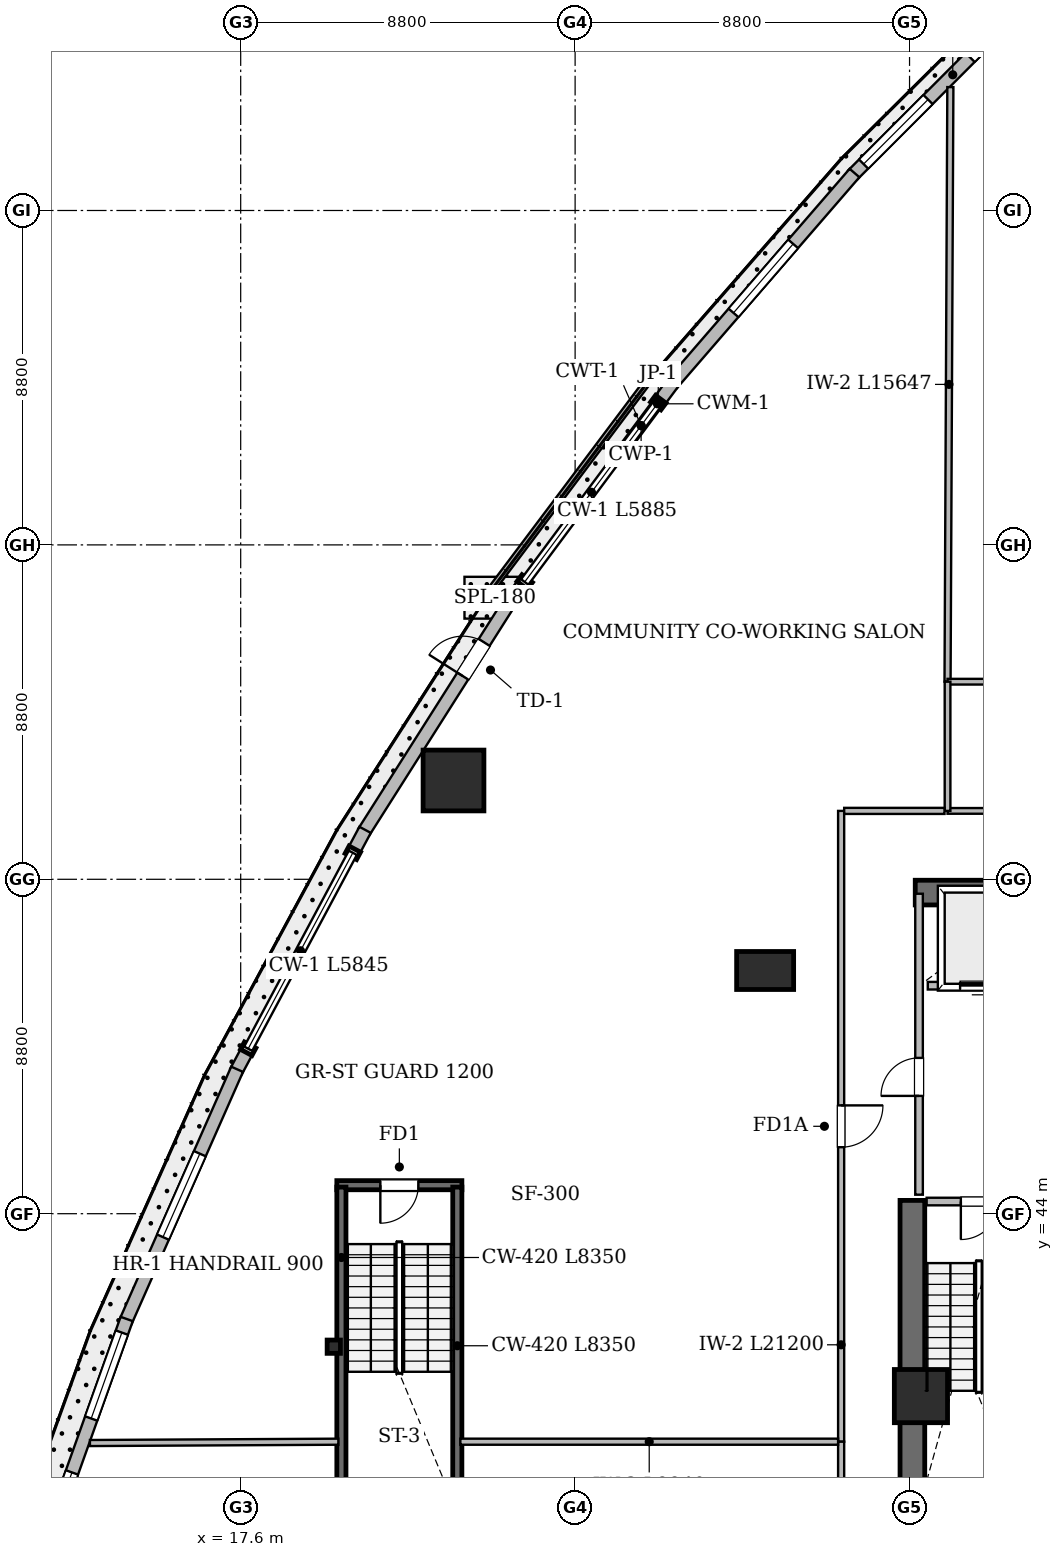
"""IFC4 building model, lengths in metres.
Left out: names, types, materials, properties, quantities, classifications, styles, units other than length and angle.
Written with IfcOpenShell. Run it as: python <this file> out.ifc"""

import sys

from ifc_helpers import new_model, si_unit, direction, frame, frame_2d, origin, origin_2d, place, context, subcontext, project, spatial, rectangle, i_section, extrude, element, fill, save


model = new_model("IFC4")
c1 = context("Model", 3, precision=1e-05, world=origin(), true_north=direction((0.0, 1.0)))
c2 = subcontext(c1, "Body", "Model", "MODEL_VIEW")
j1 = project(units=[si_unit("LENGTHUNIT", "METRE"), si_unit("PLANEANGLEUNIT", "RADIAN")], contexts=[c1])
p1 = place(None, origin())
s1 = spatial("IfcSite", under=j1, at=p1, CompositionType="ELEMENT")
p2 = place(p1, origin())
s2 = spatial("IfcBuilding", under=s1, at=p2, CompositionType="ELEMENT")
p3 = place(p2, frame((0.0, 0.0, 4.8)))
s3 = spatial("IfcBuildingStorey", under=s2, at=p3, CompositionType="ELEMENT", Elevation=4.8)
p4 = place(p3, frame((35.35, 52.45, 0.0), z_axis=(0.0, 0.0, 1.0), x_axis=(1.0, 0.0, 0.0)))
e1 = element("IfcWall", 1, at=p4, inside=s3, PredefinedType="SHEAR", context=c2, shape_type="SweptSolid", body=[
    extrude(rectangle(XDim=17.3, YDim=0.65, at=frame_2d((8.65, 0.0))), origin(), (0.0, 0.0, 1.0), 4.5),
])
p5 = place(p3, frame((35.275, 34.95, 0.0), z_axis=(0.0, 0.0, 1.0), x_axis=(0.0, 1.0, 0.0)))
e2 = element("IfcWall", 2, at=p5, inside=s3, PredefinedType="SHEAR", context=c2, shape_type="SweptSolid", body=[
    extrude(rectangle(XDim=9.4, YDim=0.65, at=frame_2d((4.7, 0.0))), origin(), (0.0, 0.0, 1.0), 4.5),
])
p6 = place(p3, frame((35.5, 39.2, 0.0), z_axis=(0.0, 0.0, 1.0), x_axis=(1.0, 0.0, 0.0)))
e3 = element("IfcColumn", 3, at=p6, inside=s3, PredefinedType="COLUMN", context=c2, shape_type="SweptSolid", body=[
    extrude(rectangle(XDim=1.4, YDim=1.4, at=origin_2d()), origin(), (0.0, 0.0, 1.0), 4.8),
])
p7 = place(p3, frame((31.4, 50.4, 0.0), z_axis=(0.0, 0.0, 1.0), x_axis=(1.0, 0.0, 0.0)))
e4 = element("IfcColumn", 4, at=p7, inside=s3, PredefinedType="COLUMN", context=c2, shape_type="SweptSolid", body=[
    extrude(rectangle(XDim=1.5, YDim=1.0, at=origin_2d()), origin(), (0.0, 0.0, 1.0), 4.8),
])
p8 = place(p3, frame((23.2, 55.4, 0.0), z_axis=(0.0, 0.0, 1.0), x_axis=(1.0, 0.0, 0.0)))
e5 = element("IfcColumn", 5, at=p8, inside=s3, PredefinedType="COLUMN", context=c2, shape_type="SweptSolid", body=[
    extrude(rectangle(XDim=1.6, YDim=1.6, at=origin_2d()), origin(), (0.0, 0.0, 1.0), 4.8),
])
p9 = place(p3, frame((20.05, 40.5, 0.0), z_axis=(0.0, 0.0, 1.0), x_axis=(1.0, 0.0, 0.0)))
e6 = element("IfcColumn", 6, at=p9, inside=s3, PredefinedType="PILASTER", context=c2, shape_type="SweptSolid", body=[
    extrude(i_section(OverallWidth=0.35, OverallDepth=0.35, WebThickness=0.012, FlangeThickness=0.019, FilletRadius=0.02, at=origin_2d()), origin(), (0.0, 0.0, 1.0), 4.8),
])
p10 = place(p3, frame((38.97, 76.608, 0.0), z_axis=(0.0, 0.0, 1.0), x_axis=(-0.706565985712, -0.707647163377, 0.0)))
e7 = element("IfcWall", 7, at=p10, inside=s3, PredefinedType="SOLIDWALL", context=c2, shape_type="SweptSolid", body=[
    extrude(rectangle(XDim=7.452, YDim=0.34, at=frame_2d((3.726, 0.0))), origin(), (0.0, 0.0, 1.0), 4.5),
])
p11 = place(p10, frame((0.68, 0.0, 0.75)))
e8 = element("IfcOpeningElement", 8, at=p11, cuts=e7, PredefinedType="OPENING", context=c2, shape_type="SweptSolid", body=[
    extrude(rectangle(XDim=2.4, YDim=2.2, at=frame_2d((1.2, 1.1))), frame((0.0, 0.18, 0.0), z_axis=(0.0, -1.0, 0.0), x_axis=(1.0, 0.0, 0.0)), (0.0, 0.0, 1.0), 0.36),
])
p12 = place(p10, frame((4.646, 0.0, 0.75)))
e9 = element("IfcOpeningElement", 9, at=p12, cuts=e7, PredefinedType="OPENING", context=c2, shape_type="SweptSolid", body=[
    extrude(rectangle(XDim=2.4, YDim=2.2, at=frame_2d((1.2, 1.1))), frame((0.0, 0.18, 0.0), z_axis=(0.0, -1.0, 0.0), x_axis=(1.0, 0.0, 0.0)), (0.0, 0.0, 1.0), 0.36),
])
p13 = place(p3, frame((33.752, 71.386, 0.0), z_axis=(0.0, 0.0, 1.0), x_axis=(-0.654356245841, -0.756186421148, 0.0)))
e10 = element("IfcWall", 10, at=p13, inside=s3, PredefinedType="SOLIDWALL", context=c2, shape_type="SweptSolid", body=[
    extrude(rectangle(XDim=7.334, YDim=0.34, at=frame_2d((3.667, 0.0))), origin(), (0.0, 0.0, 1.0), 4.5),
])
p14 = place(p13, frame((2.467, 0.0, 0.75)))
e11 = element("IfcOpeningElement", 11, at=p14, cuts=e10, PredefinedType="OPENING", context=c2, shape_type="SweptSolid", body=[
    extrude(rectangle(XDim=2.4, YDim=2.2, at=frame_2d((1.2, 1.1))), frame((0.0, 0.18, 0.0), z_axis=(0.0, -1.0, 0.0), x_axis=(1.0, 0.0, 0.0)), (0.0, 0.0, 1.0), 0.36),
])
for number, where, z_axis, x_axis in (
    (12, (28.997, 65.895, 0.0), (0.0, 0.0, 1.0), (-0.597, -0.802, 0.0)),
    (13, (25.085, 60.641, 0.0), (0.0, 0.0, 1.0), (-0.597, -0.802, 0.0)),
):
    element("IfcWall", number, at=place(p3, frame(where, z_axis=z_axis, x_axis=x_axis)), inside=s3, PredefinedType="SOLIDWALL", context=c2, shape_type="SweptSolid", body=[
        extrude(rectangle(XDim=0.705, YDim=0.34, at=frame_2d((0.353, 0.0))), origin(), (0.0, 0.0, 1.0), 4.5),
    ])
p15 = place(p3, frame((24.704, 60.133, 0.0), z_axis=(0.0, 0.0, 1.0), x_axis=(-0.535802171835, -0.844343551321, 0.0)))
e14 = element("IfcWall", 14, at=p15, inside=s3, PredefinedType="SOLIDWALL", context=c2, shape_type="SweptSolid", body=[
    extrude(rectangle(XDim=7.215, YDim=0.34, at=frame_2d((3.607, 0.0))), origin(), (0.0, 0.0, 1.0), 4.5),
])
p16 = place(p15, frame((1.301, 0.0, 0.0)))
e15 = element("IfcOpeningElement", 15, at=p16, cuts=e14, PredefinedType="OPENING", context=c2, shape_type="SweptSolid", body=[
    extrude(rectangle(XDim=1.05, YDim=2.15, at=frame_2d((0.525, 1.075))), frame((0.0, 0.18, 0.0), z_axis=(0.0, -1.0, 0.0), x_axis=(1.0, 0.0, 0.0)), (0.0, 0.0, 1.0), 0.36),
])
p17 = place(p3, frame((20.874, 54.102, 0.0), z_axis=(0.0, 0.0, 1.0), x_axis=(-0.471145137046, -0.882055701097, 0.0)))
e16 = element("IfcWall", 16, at=p17, inside=s3, PredefinedType="SOLIDWALL", context=c2, shape_type="SweptSolid", body=[
    extrude(rectangle(XDim=0.705, YDim=0.34, at=frame_2d((0.353, 0.0))), origin(), (0.0, 0.0, 1.0), 4.5),
])
p18 = place(p3, frame((17.807, 48.359, 0.0), z_axis=(0.0, 0.0, 1.0), x_axis=(-0.471163543588, -0.882045869099, 0.0)))
e17 = element("IfcWall", 17, at=p18, inside=s3, PredefinedType="SOLIDWALL", context=c2, shape_type="SweptSolid", body=[
    extrude(rectangle(XDim=0.705, YDim=0.34, at=frame_2d((0.352, 0.0))), origin(), (0.0, 0.0, 1.0), 4.5),
])
p19 = place(p3, frame((17.506, 47.8, 0.0), z_axis=(0.0, 0.0, 1.0), x_axis=(-0.40401716618, -0.914751403077, 0.0)))
e18 = element("IfcWall", 18, at=p19, inside=s3, PredefinedType="SOLIDWALL", context=c2, shape_type="SweptSolid", body=[
    extrude(rectangle(XDim=7.254, YDim=0.34, at=frame_2d((3.627, 0.0))), origin(), (0.0, 0.0, 1.0), 4.5),
])
p20 = place(p19, frame((2.428, 0.0, 0.75)))
e19 = element("IfcOpeningElement", 19, at=p20, cuts=e18, PredefinedType="OPENING", context=c2, shape_type="SweptSolid", body=[
    extrude(rectangle(XDim=2.4, YDim=2.2, at=frame_2d((1.2, 1.1))), frame((0.0, 0.18, 0.0), z_axis=(0.0, -1.0, 0.0), x_axis=(1.0, 0.0, 0.0)), (0.0, 0.0, 1.0), 0.36),
])
p21 = place(p3, frame((14.601, 41.229, 0.0), z_axis=(0.0, 0.0, 1.0), x_axis=(-0.335971563965, -0.941872129435, 0.0)))
e20 = element("IfcWall", 20, at=p21, inside=s3, PredefinedType="SOLIDWALL", context=c2, shape_type="SweptSolid", body=[
    extrude(rectangle(XDim=7.334, YDim=0.34, at=frame_2d((3.667, 0.0))), origin(), (0.0, 0.0, 1.0), 4.5),
])
p22 = place(p21, frame((0.38, 0.0, 0.75)))
e21 = element("IfcOpeningElement", 21, at=p22, cuts=e20, PredefinedType="OPENING", context=c2, shape_type="SweptSolid", body=[
    extrude(rectangle(XDim=2.4, YDim=2.2, at=frame_2d((1.2, 1.1))), frame((0.0, 0.18, 0.0), z_axis=(0.0, -1.0, 0.0), x_axis=(1.0, 0.0, 0.0)), (0.0, 0.0, 1.0), 0.36),
])
p23 = place(p21, frame((4.287, 0.0, 0.75)))
e22 = element("IfcOpeningElement", 22, at=p23, cuts=e20, PredefinedType="OPENING", context=c2, shape_type="SweptSolid", body=[
    extrude(rectangle(XDim=2.4, YDim=2.2, at=frame_2d((1.2, 1.1))), frame((0.0, 0.18, 0.0), z_axis=(0.0, -1.0, 0.0), x_axis=(1.0, 0.0, 0.0)), (0.0, 0.0, 1.0), 0.36),
])
p24 = place(p3, frame((28.503, 66.159, 0.0), z_axis=(0.0, 0.0, 1.0), x_axis=(-0.600731281621, -0.799451016187, 0.0)))
e23 = element("IfcWall", 23, at=p24, inside=s3, PredefinedType="PARAPET", context=c2, shape_type="SweptSolid", body=[
    extrude(rectangle(XDim=7.369, YDim=0.18, at=frame_2d((3.685, 0.0))), origin(), (0.0, 0.0, 1.0), 0.45),
])
p25 = place(p3, frame((20.13, 44.75, 0.0), z_axis=(0.0, 0.0, 1.0), x_axis=(1.0, 0.0, 0.0)))
e24 = element("IfcWall", 24, at=p25, inside=s3, PredefinedType="SHEAR", context=c2, shape_type="SweptSolid", body=[
    extrude(rectangle(XDim=3.29, YDim=0.24, at=frame_2d((1.645, 0.0))), origin(), (0.0, 0.0, 1.0), 4.5),
])
p26 = place(p25, frame((1.145, 0.0, 0.0)))
e25 = element("IfcOpeningElement", 25, at=p26, cuts=e24, PredefinedType="OPENING", context=c2, shape_type="SweptSolid", body=[
    extrude(rectangle(XDim=1.0, YDim=2.15, at=frame_2d((0.5, 1.075))), frame((0.0, 0.13, 0.0), z_axis=(0.0, -1.0, 0.0), x_axis=(1.0, 0.0, 0.0)), (0.0, 0.0, 1.0), 0.26),
])
for number, where, z_axis, x_axis in (
    (26, (20.25, 36.35, 0.0), (0.0, 0.0, 1.0), (0.0, 1.0, 0.0)),
    (27, (23.3, 36.35, 0.0), (0.0, 0.0, 1.0), (0.0, 1.0, 0.0)),
):
    element("IfcWall", number, at=place(p3, frame(where, z_axis=z_axis, x_axis=x_axis)), inside=s3, PredefinedType="SHEAR", context=c2, shape_type="SweptSolid", body=[
        extrude(rectangle(XDim=8.35, YDim=0.24, at=frame_2d((4.175, 0.0))), origin(), (0.0, 0.0, 1.0), 4.5),
    ])
p27 = place(p3, frame((33.4, 54.6, 0.0), z_axis=(0.0, 0.0, 1.0), x_axis=(0.0, -1.0, 0.0)))
e28 = element("IfcWall", 28, at=p27, inside=s3, PredefinedType="SOLIDWALL", context=c2, shape_type="SweptSolid", body=[
    extrude(rectangle(XDim=16.6, YDim=0.16, at=frame_2d((8.3, 0.0))), origin(), (0.0, 0.0, 1.0), 4.0),
])
p28 = place(p27, frame((7.75, 0.0, 0.0)))
e29 = element("IfcOpeningElement", 29, at=p28, cuts=e28, PredefinedType="OPENING", context=c2, shape_type="SweptSolid", body=[
    extrude(rectangle(XDim=1.1, YDim=2.15, at=frame_2d((0.55, 1.075))), frame((0.0, 0.09, 0.0), z_axis=(0.0, -1.0, 0.0), x_axis=(1.0, 0.0, 0.0)), (0.0, 0.0, 1.0), 0.18),
])
p29 = place(p3, frame((35.45, 44.5, 0.0), z_axis=(0.0, 0.0, 1.0), x_axis=(0.0, 1.0, 0.0)))
e30 = element("IfcWall", 30, at=p29, inside=s3, PredefinedType="SOLIDWALL", context=c2, shape_type="SweptSolid", body=[
    extrude(rectangle(XDim=7.92, YDim=0.2, at=frame_2d((3.96, 0.0))), origin(), (0.0, 0.0, 1.0), 4.5),
])
p30 = place(p29, frame((2.6, 0.0, 0.0)))
e31 = element("IfcOpeningElement", 31, at=p30, cuts=e30, PredefinedType="OPENING", context=c2, shape_type="SweptSolid", body=[
    extrude(rectangle(XDim=1.0, YDim=2.15, at=frame_2d((0.5, 1.075))), frame((0.0, 0.11, 0.0), z_axis=(0.0, -1.0, 0.0), x_axis=(1.0, 0.0, 0.0)), (0.0, 0.0, 1.0), 0.22),
])
p31 = place(p3, frame((33.4, 38.0, 0.0), z_axis=(0.0, 0.0, 1.0), x_axis=(0.0, -1.0, 0.0)))
e32 = element("IfcWall", 32, at=p31, inside=s3, PredefinedType="SOLIDWALL", context=c2, shape_type="SweptSolid", body=[
    extrude(rectangle(XDim=4.6, YDim=0.16, at=frame_2d((2.3, 0.0))), origin(), (0.0, 0.0, 1.0), 4.0),
])
p32 = place(p31, frame((2.65, 0.0, 0.0)))
e33 = element("IfcOpeningElement", 33, at=p32, cuts=e32, PredefinedType="OPENING", context=c2, shape_type="SweptSolid", body=[
    extrude(rectangle(XDim=1.1, YDim=2.15, at=frame_2d((0.55, 1.075))), frame((0.0, 0.09, 0.0), z_axis=(0.0, -1.0, 0.0), x_axis=(1.0, 0.0, 0.0)), (0.0, 0.0, 1.0), 0.18),
])
p33 = place(p3, frame((40.0, 54.6, 0.0), z_axis=(0.0, 0.0, 1.0), x_axis=(-1.0, 0.0, 0.0)))
e34 = element("IfcWall", 34, at=p33, inside=s3, PredefinedType="PLUMBINGWALL", context=c2, shape_type="SweptSolid", body=[
    extrude(rectangle(XDim=3.8, YDim=0.15, at=frame_2d((1.9, 0.0))), origin(), (0.0, 0.0, 1.0), 4.0),
])
p34 = place(p33, frame((1.45, 0.0, 0.0)))
e35 = element("IfcOpeningElement", 35, at=p34, cuts=e34, PredefinedType="OPENING", context=c2, shape_type="SweptSolid", body=[
    extrude(rectangle(XDim=0.9, YDim=2.1, at=frame_2d((0.45, 1.05))), frame((0.0, 0.085, 0.0), z_axis=(0.0, -1.0, 0.0), x_axis=(1.0, 0.0, 0.0)), (0.0, 0.0, 1.0), 0.17),
])
p35 = place(p3, frame((35.65, 44.32, 0.0), z_axis=(0.0, 0.0, 1.0), x_axis=(1.0, 0.0, 0.0)))
e36 = element("IfcWall", 36, at=p35, inside=s3, PredefinedType="SOLIDWALL", context=c2, shape_type="SweptSolid", body=[
    extrude(rectangle(XDim=2.8, YDim=0.2, at=frame_2d((1.4, 0.0))), origin(), (0.0, 0.0, 1.0), 4.5),
])
p36 = place(p35, frame((0.9, 0.0, 0.0)))
e37 = element("IfcOpeningElement", 37, at=p36, cuts=e36, PredefinedType="OPENING", context=c2, shape_type="SweptSolid", body=[
    extrude(rectangle(XDim=1.0, YDim=2.15, at=frame_2d((0.5, 1.075))), frame((0.0, 0.11, 0.0), z_axis=(0.0, -1.0, 0.0), x_axis=(1.0, 0.0, 0.0)), (0.0, 0.0, 1.0), 0.22),
])
p37 = place(p3, frame((35.68, 50.0, 0.0), z_axis=(0.0, 0.0, 1.0), x_axis=(1.0, 0.0, 0.0)))
e38 = element("IfcWall", 38, at=p37, inside=s3, PredefinedType="SOLIDWALL", context=c2, shape_type="SweptSolid", body=[
    extrude(rectangle(XDim=2.8, YDim=0.2, at=frame_2d((1.4, 0.0))), origin(), (0.0, 0.0, 1.0), 4.5),
])
p38 = place(p37, frame((0.85, 0.0, 0.0)))
e39 = element("IfcOpeningElement", 39, at=p38, cuts=e38, PredefinedType="OPENING", context=c2, shape_type="SweptSolid", body=[
    extrude(rectangle(XDim=1.1, YDim=2.15, at=frame_2d((0.55, 1.075))), frame((0.0, 0.11, 0.0), z_axis=(0.0, -1.0, 0.0), x_axis=(1.0, 0.0, 0.0)), (0.0, 0.0, 1.0), 0.22),
])
p39 = place(p3, frame((36.2, 58.0, 0.0), z_axis=(0.0, 0.0, 1.0), x_axis=(0.0047276738, 0.999988824488, 0.0)))
e40 = element("IfcWall", 40, at=p39, inside=s3, PredefinedType="SOLIDWALL", context=c2, shape_type="SweptSolid", body=[
    extrude(rectangle(XDim=15.647, YDim=0.16, at=frame_2d((7.824, 0.0))), origin(), (0.0, 0.0, 1.0), 3.788),
])
p40 = place(p3, frame((33.32, 38.0, 0.0), z_axis=(0.0, 0.0, 1.0), x_axis=(-1.0, 0.0, 0.0)))
e41 = element("IfcWall", 41, at=p40, inside=s3, PredefinedType="SOLIDWALL", context=c2, shape_type="SweptSolid", body=[
    extrude(rectangle(XDim=9.94, YDim=0.16, at=frame_2d((4.97, 0.0))), origin(), (0.0, 0.0, 1.0), 4.0),
])
p41 = place(p3, frame((20.17, 38.0, 0.0), z_axis=(0.0, 0.0, 1.0), x_axis=(-0.999985738217, -0.005340726818, 0.0)))
e42 = element("IfcWall", 42, at=p41, inside=s3, PredefinedType="SOLIDWALL", context=c2, shape_type="SweptSolid", body=[
    extrude(rectangle(XDim=6.537, YDim=0.16, at=frame_2d((3.269, 0.0))), origin(), (0.0, 0.0, 1.0), 4.5),
])
p42 = place(p3, frame((40.0, 58.0, 0.0), z_axis=(0.0, 0.0, 1.0), x_axis=(-1.0, 0.0, 0.0)))
e43 = element("IfcWall", 43, at=p42, inside=s3, PredefinedType="PLUMBINGWALL", context=c2, shape_type="SweptSolid", body=[
    extrude(rectangle(XDim=3.8, YDim=0.15, at=frame_2d((1.9, 0.0))), origin(), (0.0, 0.0, 1.0), 4.5),
])
p43 = place(p3, frame((36.2, 58.0, 0.0), z_axis=(0.0, 0.0, 1.0), x_axis=(0.0, -1.0, 0.0)))
e44 = element("IfcWall", 44, at=p43, inside=s3, PredefinedType="PLUMBINGWALL", context=c2, shape_type="SweptSolid", body=[
    extrude(rectangle(XDim=3.4, YDim=0.15, at=frame_2d((1.7, 0.0))), origin(), (0.0, 0.0, 1.0), 4.5),
])
p44 = place(p3, frame((36.12, 54.6, 0.0), z_axis=(0.0, 0.0, 1.0), x_axis=(-1.0, 0.0, 0.0)))
e45 = element("IfcWall", 45, at=p44, inside=s3, PredefinedType="SOLIDWALL", context=c2, shape_type="SweptSolid", body=[
    extrude(rectangle(XDim=2.64, YDim=0.16, at=frame_2d((1.32, 0.0))), origin(), (0.0, 0.0, 1.0), 4.5),
])
p45 = place(p11, origin())
e46 = element("IfcWindow", 46, at=p45, inside=s3, PartitioningType="SINGLE_PANEL", PredefinedType="WINDOW", context=c2, shape_type="SweptSolid", body=[
    extrude(rectangle(XDim=2.4, YDim=2.2, at=frame_2d((1.2, 1.1))), frame((0.0, 0.03, 0.0), z_axis=(0.0, -1.0, 0.0), x_axis=(1.0, 0.0, 0.0)), (0.0, 0.0, 1.0), 0.06),
])
fill(e8, e46)
p46 = place(p12, origin())
e47 = element("IfcWindow", 47, at=p46, inside=s3, PartitioningType="SINGLE_PANEL", PredefinedType="WINDOW", context=c2, shape_type="SweptSolid", body=[
    extrude(rectangle(XDim=2.4, YDim=2.2, at=frame_2d((1.2, 1.1))), frame((0.0, 0.03, 0.0), z_axis=(0.0, -1.0, 0.0), x_axis=(1.0, 0.0, 0.0)), (0.0, 0.0, 1.0), 0.06),
])
fill(e9, e47)
p47 = place(p14, origin())
e48 = element("IfcWindow", 48, at=p47, inside=s3, PartitioningType="SINGLE_PANEL", PredefinedType="WINDOW", context=c2, shape_type="SweptSolid", body=[
    extrude(rectangle(XDim=2.4, YDim=2.2, at=frame_2d((1.2, 1.1))), frame((0.0, 0.03, 0.0), z_axis=(0.0, -1.0, 0.0), x_axis=(1.0, 0.0, 0.0)), (0.0, 0.0, 1.0), 0.06),
])
fill(e11, e48)
p48 = place(p16, frame((1.05, 0.0, 0.0), z_axis=(0.0, 0.0, 1.0), x_axis=(-1.0, 0.0, 0.0)))
e49 = element("IfcDoor", 49, at=p48, inside=s3, OperationType="SINGLE_SWING_RIGHT", PredefinedType="DOOR", context=c2, shape_type="SweptSolid", body=[
    extrude(rectangle(XDim=1.05, YDim=2.15, at=frame_2d((0.525, 1.075))), frame((0.0, 0.025, 0.0), z_axis=(0.0, -1.0, 0.0), x_axis=(1.0, 0.0, 0.0)), (0.0, 0.0, 1.0), 0.05),
])
fill(e15, e49)
p49 = place(p20, origin())
e50 = element("IfcWindow", 50, at=p49, inside=s3, PartitioningType="SINGLE_PANEL", PredefinedType="WINDOW", context=c2, shape_type="SweptSolid", body=[
    extrude(rectangle(XDim=2.4, YDim=2.2, at=frame_2d((1.2, 1.1))), frame((0.0, 0.03, 0.0), z_axis=(0.0, -1.0, 0.0), x_axis=(1.0, 0.0, 0.0)), (0.0, 0.0, 1.0), 0.06),
])
fill(e19, e50)
p50 = place(p22, origin())
e51 = element("IfcWindow", 51, at=p50, inside=s3, PartitioningType="SINGLE_PANEL", PredefinedType="WINDOW", context=c2, shape_type="SweptSolid", body=[
    extrude(rectangle(XDim=2.4, YDim=2.2, at=frame_2d((1.2, 1.1))), frame((0.0, 0.03, 0.0), z_axis=(0.0, -1.0, 0.0), x_axis=(1.0, 0.0, 0.0)), (0.0, 0.0, 1.0), 0.06),
])
fill(e21, e51)
p51 = place(p23, origin())
e52 = element("IfcWindow", 52, at=p51, inside=s3, PartitioningType="SINGLE_PANEL", PredefinedType="WINDOW", context=c2, shape_type="SweptSolid", body=[
    extrude(rectangle(XDim=2.4, YDim=2.2, at=frame_2d((1.2, 1.1))), frame((0.0, 0.03, 0.0), z_axis=(0.0, -1.0, 0.0), x_axis=(1.0, 0.0, 0.0)), (0.0, 0.0, 1.0), 0.06),
])
fill(e22, e52)
p52 = place(p26, frame((1.0, 0.0, 0.0), z_axis=(0.0, 0.0, 1.0), x_axis=(-1.0, 0.0, 0.0)))
e53 = element("IfcDoor", 53, at=p52, inside=s3, OperationType="SINGLE_SWING_LEFT", PredefinedType="DOOR", context=c2, shape_type="SweptSolid", body=[
    extrude(rectangle(XDim=1.0, YDim=2.15, at=frame_2d((0.5, 1.075))), frame((0.0, 0.025, 0.0), z_axis=(0.0, -1.0, 0.0), x_axis=(1.0, 0.0, 0.0)), (0.0, 0.0, 1.0), 0.05),
])
fill(e25, e53)
p53 = place(p36, frame((1.0, 0.0, 0.0), z_axis=(0.0, 0.0, 1.0), x_axis=(-1.0, 0.0, 0.0)))
e54 = element("IfcDoor", 54, at=p53, inside=s3, OperationType="SINGLE_SWING_LEFT", PredefinedType="DOOR", context=c2, shape_type="SweptSolid", body=[
    extrude(rectangle(XDim=1.0, YDim=2.15, at=frame_2d((0.5, 1.075))), frame((0.0, 0.025, 0.0), z_axis=(0.0, -1.0, 0.0), x_axis=(1.0, 0.0, 0.0)), (0.0, 0.0, 1.0), 0.05),
])
fill(e37, e54)
p54 = place(p30, origin())
e55 = element("IfcDoor", 55, at=p54, inside=s3, OperationType="SINGLE_SWING_LEFT", PredefinedType="DOOR", context=c2, shape_type="SweptSolid", body=[
    extrude(rectangle(XDim=1.0, YDim=2.15, at=frame_2d((0.5, 1.075))), frame((0.0, 0.025, 0.0), z_axis=(0.0, -1.0, 0.0), x_axis=(1.0, 0.0, 0.0)), (0.0, 0.0, 1.0), 0.05),
])
fill(e31, e55)
p55 = place(p38, origin())
e56 = element("IfcDoor", 56, at=p55, inside=s3, OperationType="SLIDING_TO_LEFT", PredefinedType="DOOR", context=c2, shape_type="SweptSolid", body=[
    extrude(rectangle(XDim=1.1, YDim=2.15, at=frame_2d((0.55, 1.075))), frame((0.0, 0.025, 0.0), z_axis=(0.0, -1.0, 0.0), x_axis=(1.0, 0.0, 0.0)), (0.0, 0.0, 1.0), 0.05),
])
fill(e39, e56)
p56 = place(p28, origin())
e57 = element("IfcDoor", 57, at=p56, inside=s3, OperationType="SINGLE_SWING_LEFT", PredefinedType="DOOR", context=c2, shape_type="SweptSolid", body=[
    extrude(rectangle(XDim=1.1, YDim=2.15, at=frame_2d((0.55, 1.075))), frame((0.0, 0.025, 0.0), z_axis=(0.0, -1.0, 0.0), x_axis=(1.0, 0.0, 0.0)), (0.0, 0.0, 1.0), 0.05),
])
fill(e29, e57)
save(model, sys.argv[1])
